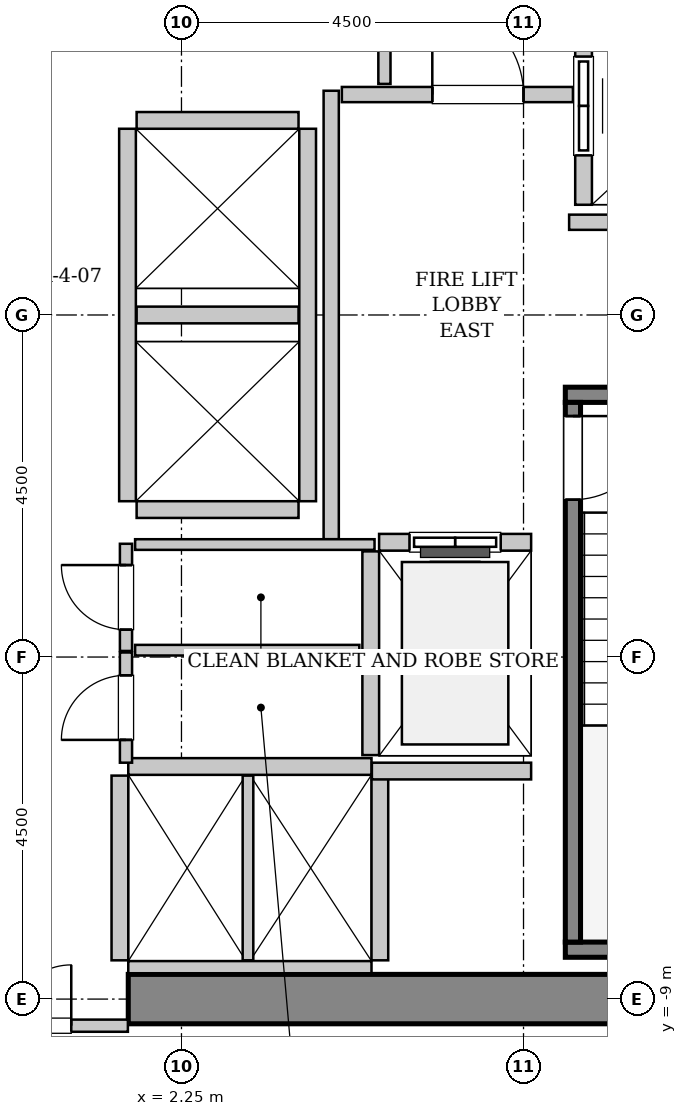
"""IFC4 building model, lengths in metres.
Left out: names, types, materials, properties, quantities, classifications, styles, units other than length and angle.
Written with IfcOpenShell. Run it as: python <this file> out.ifc"""

import sys

from ifc_helpers import new_model, si_unit, direction, frame, frame_2d, origin, place, context, subcontext, project, spatial, rectangle, extrude, source, transform, mapped, element, fill, save


model = new_model("IFC4")
c1 = context("Model", 3, precision=1e-05, world=origin(), true_north=direction((0.0, 1.0)))
c2 = subcontext(c1, "Body", "Model", "MODEL_VIEW")
j1 = project(units=[si_unit("LENGTHUNIT", "METRE"), si_unit("PLANEANGLEUNIT", "RADIAN")], contexts=[c1])
p1 = place(None, origin())
s1 = spatial("IfcSite", under=j1, at=p1, CompositionType="ELEMENT")
p2 = place(p1, origin())
s2 = spatial("IfcBuilding", under=s1, at=p2, CompositionType="ELEMENT")
p3 = place(p2, frame((0.0, 0.0, 40.6)))
s3 = spatial("IfcBuildingStorey", under=s2, at=p3, CompositionType="ELEMENT", Elevation=40.6)
m1 = source(origin(), c2, "Body", "SweptSolid", [
    extrude(rectangle(XDim=10.025, YDim=0.65, at=frame_2d((5.012, 0.0))), origin(), (0.0, 0.0, 1.0), 3.8),
])
p4 = place(p3, frame((1.55, -9.0, 0.0), z_axis=(0.0, 0.0, 1.0), x_axis=(1.0, 0.0, 0.0)))
e1 = element("IfcWall", 1, at=p4, inside=s3, PredefinedType="SHEAR", context=c2, shape_type="MappedRepresentation", body=[
    mapped(m1, transform((0.0, 0.0, 0.0), x_axis=(1.0, 0.0, 0.0), y_axis=(0.0, 1.0, 0.0), z_axis=(0.0, 0.0, 1.0), scale=1.0)),
])
m2 = source(origin(), c2, "Body", "SweptSolid", [
    extrude(rectangle(XDim=3.4, YDim=0.2, at=frame_2d((1.7, 0.0))), origin(), (0.0, 0.0, 1.0), 3.8),
])
p5 = place(p3, frame((7.3, -1.05, 0.0), z_axis=(0.0, 0.0, 1.0), x_axis=(1.0, 0.0, 0.0)))
e2 = element("IfcWall", 2, at=p5, inside=s3, PredefinedType="SOLIDWALL", context=c2, shape_type="MappedRepresentation", body=[
    mapped(m2, transform((0.0, 0.0, 0.0), x_axis=(1.0, 0.0, 0.0), y_axis=(0.0, 1.0, 0.0), z_axis=(0.0, 0.0, 1.0), scale=1.0)),
])
m3 = source(origin(), c2, "Body", "SweptSolid", [
    extrude(rectangle(XDim=3.63, YDim=0.2, at=frame_2d((1.815, 0.0))), origin(), (0.0, 0.0, 1.0), 3.8),
])
p6 = place(p3, frame((7.3, -8.35, 0.0), z_axis=(0.0, 0.0, 1.0), x_axis=(1.0, 0.0, 0.0)))
e3 = element("IfcWall", 3, at=p6, inside=s3, PredefinedType="SOLIDWALL", context=c2, shape_type="MappedRepresentation", body=[
    mapped(m3, transform((0.0, 0.0, 0.0), x_axis=(1.0, 0.0, 0.0), y_axis=(0.0, 1.0, 0.0), z_axis=(0.0, 0.0, 1.0), scale=1.0)),
])
m4 = source(origin(), c2, "Body", "SweptSolid", [
    extrude(rectangle(XDim=7.1, YDim=0.2, at=frame_2d((3.55, 0.0))), origin(), (0.0, 0.0, 1.0), 3.8),
])
p7 = place(p3, frame((7.4, -1.15, 0.0), z_axis=(0.0, 0.0, 1.0), x_axis=(0.0, -1.0, 0.0)))
e4 = element("IfcWall", 4, at=p7, inside=s3, PredefinedType="SOLIDWALL", context=c2, shape_type="MappedRepresentation", body=[
    mapped(m4, transform((0.0, 0.0, 0.0), x_axis=(1.0, 0.0, 0.0), y_axis=(0.0, 1.0, 0.0), z_axis=(0.0, 0.0, 1.0), scale=1.0)),
])
p8 = place(p7, frame((0.18, 0.0, 0.0)))
e5 = element("IfcOpeningElement", 5, at=p8, cuts=e4, PredefinedType="OPENING", context=c2, shape_type="SweptSolid", body=[
    extrude(rectangle(XDim=1.1, YDim=2.15, at=frame_2d((0.55, 1.075))), frame((0.0, 0.11, 0.0), z_axis=(0.0, -1.0, 0.0), x_axis=(1.0, 0.0, 0.0)), (0.0, 0.0, 1.0), 0.22),
])
m5 = source(origin(), c2, "Body", "SweptSolid", [
    extrude(rectangle(XDim=2.0, YDim=0.22, at=frame_2d((1.0, 0.0))), origin(), (0.0, 0.0, 1.0), 3.535),
])
p9 = place(p3, frame((6.85, -2.99, 0.0), z_axis=(0.0, 0.0, 1.0), x_axis=(-1.0, 0.0, 0.0)))
e6 = element("IfcWall", 6, at=p9, inside=s3, PredefinedType="SOLIDWALL", context=c2, shape_type="MappedRepresentation", body=[
    mapped(m5, transform((0.0, 0.0, 0.0), x_axis=(1.0, 0.0, 0.0), y_axis=(0.0, 1.0, 0.0), z_axis=(0.0, 0.0, 1.0), scale=1.0)),
])
p10 = place(p9, frame((0.4, 0.0, 0.0)))
e7 = element("IfcOpeningElement", 7, at=p10, cuts=e6, PredefinedType="OPENING", context=c2, shape_type="SweptSolid", body=[
    extrude(rectangle(XDim=1.2, YDim=2.2, at=frame_2d((0.6, 1.1))), frame((0.0, 0.12, 0.0), z_axis=(0.0, -1.0, 0.0), x_axis=(1.0, 0.0, 0.0)), (0.0, 0.0, 1.0), 0.24),
])
m6 = source(origin(), c2, "Body", "SweptSolid", [
    extrude(rectangle(XDim=2.68, YDim=0.22, at=frame_2d((1.34, 0.0))), origin(), (0.0, 0.0, 1.0), 3.535),
])
p11 = place(p3, frame((4.74, -3.11, 0.0), z_axis=(0.0, 0.0, 1.0), x_axis=(0.0, -1.0, 0.0)))
e8 = element("IfcWall", 8, at=p11, inside=s3, PredefinedType="SOLIDWALL", context=c2, shape_type="MappedRepresentation", body=[
    mapped(m6, transform((0.0, 0.0, 0.0), x_axis=(1.0, 0.0, 0.0), y_axis=(0.0, 1.0, 0.0), z_axis=(0.0, 0.0, 1.0), scale=1.0)),
])
m7 = source(origin(), c2, "Body", "SweptSolid", [
    extrude(rectangle(XDim=5.45, YDim=0.22, at=frame_2d((2.725, 0.0))), origin(), (0.0, 0.0, 1.0), 3.535),
])
p12 = place(p3, frame((7.54, 6.9, 0.0), z_axis=(0.0, 0.0, 1.0), x_axis=(0.0, -1.0, 0.0)))
e9 = element("IfcWall", 9, at=p12, inside=s3, PredefinedType="SOLIDWALL", context=c2, shape_type="MappedRepresentation", body=[
    mapped(m7, transform((0.0, 0.0, 0.0), x_axis=(1.0, 0.0, 0.0), y_axis=(0.0, 1.0, 0.0), z_axis=(0.0, 0.0, 1.0), scale=1.0)),
])
p13 = place(p12, frame((3.5, 0.0, 0.0)))
e10 = element("IfcOpeningElement", 10, at=p13, cuts=e9, PredefinedType="OPENING", context=c2, shape_type="SweptSolid", body=[
    extrude(rectangle(XDim=1.3, YDim=2.3, at=frame_2d((0.65, 1.15))), frame((0.0, 0.12, 0.0), z_axis=(0.0, -1.0, 0.0), x_axis=(1.0, 0.0, 0.0)), (0.0, 0.0, 1.0), 0.24),
])
p14 = place(p12, frame((0.65, 0.0, 0.0)))
e11 = element("IfcOpeningElement", 11, at=p14, cuts=e9, PredefinedType="OPENING", context=c2, shape_type="SweptSolid", body=[
    extrude(rectangle(XDim=1.3, YDim=2.3, at=frame_2d((0.65, 1.15))), frame((0.0, 0.12, 0.0), z_axis=(0.0, -1.0, 0.0), x_axis=(1.0, 0.0, 0.0)), (0.0, 0.0, 1.0), 0.24),
])
m8 = source(origin(), c2, "Body", "SweptSolid", [
    extrude(rectangle(XDim=3.2, YDim=0.22, at=frame_2d((1.6, 0.0))), origin(), (0.0, 0.0, 1.0), 3.535),
])
p15 = place(p3, frame((4.75, -5.94, 0.0), z_axis=(0.0, 0.0, 1.0), x_axis=(-1.0, 0.0, 0.0)))
e12 = element("IfcWall", 12, at=p15, inside=s3, PredefinedType="SOLIDWALL", context=c2, shape_type="MappedRepresentation", body=[
    mapped(m8, transform((0.0, 0.0, 0.0), x_axis=(1.0, 0.0, 0.0), y_axis=(0.0, 1.0, 0.0), z_axis=(0.0, 0.0, 1.0), scale=1.0)),
])
m9 = source(origin(), c2, "Body", "SweptSolid", [
    extrude(rectangle(XDim=3.2, YDim=0.16, at=frame_2d((1.6, 0.0))), origin(), (0.0, 0.0, 1.0), 2.425),
])
p16 = place(p3, frame((1.55, -8.58, 0.0), z_axis=(0.0, 0.0, 1.0), x_axis=(1.0, 0.0, 0.0)))
e13 = element("IfcWall", 13, at=p16, inside=s3, PredefinedType="PARTITIONING", context=c2, shape_type="MappedRepresentation", body=[
    mapped(m9, transform((0.0, 0.0, 0.0), x_axis=(1.0, 0.0, 0.0), y_axis=(0.0, 1.0, 0.0), z_axis=(0.0, 0.0, 1.0), scale=1.0)),
])
m10 = source(origin(), c2, "Body", "SweptSolid", [
    extrude(rectangle(XDim=2.43, YDim=0.22, at=frame_2d((1.215, 0.0))), origin(), (0.0, 0.0, 1.0), 3.535),
])
p17 = place(p3, frame((1.44, -6.06, 0.0), z_axis=(0.0, 0.0, 1.0), x_axis=(0.0, -1.0, 0.0)))
e14 = element("IfcWall", 14, at=p17, inside=s3, PredefinedType="SOLIDWALL", context=c2, shape_type="MappedRepresentation", body=[
    mapped(m10, transform((0.0, 0.0, 0.0), x_axis=(1.0, 0.0, 0.0), y_axis=(0.0, 1.0, 0.0), z_axis=(0.0, 0.0, 1.0), scale=1.0)),
])
m11 = source(origin(), c2, "Body", "SweptSolid", [
    extrude(rectangle(XDim=2.43, YDim=0.14, at=frame_2d((1.215, 0.0))), origin(), (0.0, 0.0, 1.0), 3.535),
])
p18 = place(p3, frame((3.125, -8.49, 0.0), z_axis=(0.0, 0.0, 1.0), x_axis=(0.0, 1.0, 0.0)))
e15 = element("IfcWall", 15, at=p18, inside=s3, PredefinedType="PARTITIONING", context=c2, shape_type="MappedRepresentation", body=[
    mapped(m11, transform((0.0, 0.0, 0.0), x_axis=(1.0, 0.0, 0.0), y_axis=(0.0, 1.0, 0.0), z_axis=(0.0, 0.0, 1.0), scale=1.0)),
])
p19 = place(p3, frame((4.86, -8.49, 0.0), z_axis=(0.0, 0.0, 1.0), x_axis=(0.0, 1.0, 0.0)))
e16 = element("IfcWall", 16, at=p19, inside=s3, PredefinedType="SOLIDWALL", context=c2, shape_type="MappedRepresentation", body=[
    mapped(m10, transform((0.0, 0.0, 0.0), x_axis=(1.0, 0.0, 0.0), y_axis=(0.0, 1.0, 0.0), z_axis=(0.0, 0.0, 1.0), scale=1.0)),
])
m12 = source(origin(), c2, "Body", "SweptSolid", [
    extrude(rectangle(XDim=4.9, YDim=0.22, at=frame_2d((2.45, 0.0))), origin(), (0.0, 0.0, 1.0), 3.535),
])
for number, where, z_axis, x_axis in (
    (17, (1.54, 2.45, 0.0), (0.0, 0.0, 1.0), (0.0, -1.0, 0.0)),
    (18, (3.91, -2.45, 0.0), (0.0, 0.0, 1.0), (0.0, 1.0, 0.0)),
):
    element("IfcWall", number, at=place(p3, frame(where, z_axis=z_axis, x_axis=x_axis)), inside=s3, PredefinedType="SOLIDWALL", context=c2, shape_type="MappedRepresentation", body=[
        mapped(m12, transform((0.0, 0.0, 0.0), x_axis=(1.0, 0.0, 0.0), y_axis=(0.0, 1.0, 0.0), z_axis=(0.0, 0.0, 1.0), scale=1.0)),
    ])
m13 = source(origin(), c2, "Body", "SweptSolid", [
    extrude(rectangle(XDim=2.13, YDim=0.22, at=frame_2d((1.065, 0.0))), origin(), (0.0, 0.0, 1.0), 3.535),
])
for number, where, z_axis, x_axis in (
    (19, (1.66, -2.56, 0.0), (0.0, 0.0, 1.0), (1.0, 0.0, 0.0)),
    (20, (1.66, 0.0, 0.0), (0.0, 0.0, 1.0), (1.0, 0.0, 0.0)),
    (21, (3.79, 2.56, 0.0), (0.0, 0.0, 1.0), (-1.0, 0.0, 0.0)),
):
    element("IfcWall", number, at=place(p3, frame(where, z_axis=z_axis, x_axis=x_axis)), inside=s3, PredefinedType="SOLIDWALL", context=c2, shape_type="MappedRepresentation", body=[
        mapped(m13, transform((0.0, 0.0, 0.0), x_axis=(1.0, 0.0, 0.0), y_axis=(0.0, 1.0, 0.0), z_axis=(0.0, 0.0, 1.0), scale=1.0)),
    ])
m14 = source(origin(), c2, "Body", "SweptSolid", [
    extrude(rectangle(XDim=2.095, YDim=0.22, at=frame_2d((1.048, 0.0))), origin(), (0.0, 0.0, 1.0), 3.535),
])
p20 = place(p3, frame((4.755, -6.0, 0.0), z_axis=(0.0, 0.0, 1.0), x_axis=(1.0, 0.0, 0.0)))
e22 = element("IfcWall", 22, at=p20, inside=s3, PredefinedType="SOLIDWALL", context=c2, shape_type="MappedRepresentation", body=[
    mapped(m14, transform((0.0, 0.0, 0.0), x_axis=(1.0, 0.0, 0.0), y_axis=(0.0, 1.0, 0.0), z_axis=(0.0, 0.0, 1.0), scale=1.0)),
])
m15 = source(origin(), c2, "Body", "SweptSolid", [
    extrude(rectangle(XDim=5.9, YDim=0.2, at=frame_2d((2.95, 0.0))), origin(), (0.0, 0.0, 1.0), 3.535),
])
p21 = place(p3, frame((4.22, -2.95, 0.0), z_axis=(0.0, 0.0, 1.0), x_axis=(0.0, 1.0, 0.0)))
e23 = element("IfcWall", 23, at=p21, inside=s3, PredefinedType="PARTITIONING", context=c2, shape_type="MappedRepresentation", body=[
    mapped(m15, transform((0.0, 0.0, 0.0), x_axis=(1.0, 0.0, 0.0), y_axis=(0.0, 1.0, 0.0), z_axis=(0.0, 0.0, 1.0), scale=1.0)),
])
m16 = source(origin(), c2, "Body", "SweptSolid", [
    extrude(rectangle(XDim=3.04, YDim=0.2, at=frame_2d((1.52, 0.0))), origin(), (0.0, 0.0, 1.0), 3.535),
])
p22 = place(p3, frame((4.36, 2.9, 0.0), z_axis=(0.0, 0.0, 1.0), x_axis=(1.0, 0.0, 0.0)))
e24 = element("IfcWall", 24, at=p22, inside=s3, PredefinedType="PARTITIONING", context=c2, shape_type="MappedRepresentation", body=[
    mapped(m16, transform((0.0, 0.0, 0.0), x_axis=(1.0, 0.0, 0.0), y_axis=(0.0, 1.0, 0.0), z_axis=(0.0, 0.0, 1.0), scale=1.0)),
])
p23 = place(p22, frame((1.19, 0.0, 0.0)))
e25 = element("IfcOpeningElement", 25, at=p23, cuts=e24, PredefinedType="OPENING", context=c2, shape_type="SweptSolid", body=[
    extrude(rectangle(XDim=1.2, YDim=2.15, at=frame_2d((0.6, 1.075))), frame((0.0, 0.11, 0.0), z_axis=(0.0, -1.0, 0.0), x_axis=(1.0, 0.0, 0.0)), (0.0, 0.0, 1.0), 0.22),
])
m17 = source(origin(), c2, "Body", "SweptSolid", [
    extrude(rectangle(XDim=4.11, YDim=0.2, at=frame_2d((2.055, 0.0))), origin(), (0.0, 0.0, 1.0), 3.535),
])
p24 = place(p3, frame((7.35, 1.22, 0.0), z_axis=(0.0, 0.0, 1.0), x_axis=(1.0, 0.0, 0.0)))
e26 = element("IfcWall", 26, at=p24, inside=s3, PredefinedType="PARTITIONING", context=c2, shape_type="MappedRepresentation", body=[
    mapped(m17, transform((0.0, 0.0, 0.0), x_axis=(1.0, 0.0, 0.0), y_axis=(0.0, 1.0, 0.0), z_axis=(0.0, 0.0, 1.0), scale=1.0)),
])
m18 = source(origin(), c2, "Body", "SweptSolid", [
    extrude(rectangle(XDim=3.09, YDim=0.16, at=frame_2d((1.545, 0.0))), origin(), (0.0, 0.0, 1.0), 2.425),
])
p25 = place(p3, frame((-1.545, -9.35, 0.0), z_axis=(0.0, 0.0, 1.0), x_axis=(1.0, 0.0, 0.0)))
e27 = element("IfcWall", 27, at=p25, inside=s3, PredefinedType="PARTITIONING", context=c2, shape_type="MappedRepresentation", body=[
    mapped(m18, transform((0.0, 0.0, 0.0), x_axis=(1.0, 0.0, 0.0), y_axis=(0.0, 1.0, 0.0), z_axis=(0.0, 0.0, 1.0), scale=1.0)),
])
p26 = place(p25, frame((0.745, 0.0, 0.0)))
e28 = element("IfcOpeningElement", 28, at=p26, cuts=e27, PredefinedType="OPENING", context=c2, shape_type="SweptSolid", body=[
    extrude(rectangle(XDim=1.6, YDim=2.3, at=frame_2d((0.8, 1.15))), frame((0.0, 0.09, 0.0), z_axis=(0.0, -1.0, 0.0), x_axis=(1.0, 0.0, 0.0)), (0.0, 0.0, 1.0), 0.18),
])
m19 = source(origin(), c2, "Body", "SweptSolid", [
    extrude(rectangle(XDim=3.015, YDim=0.16, at=frame_2d((1.507, 0.0))), origin(), (0.0, 0.0, 1.0), 3.535),
])
p27 = place(p3, frame((4.92, 3.04, 0.0), z_axis=(0.0, 0.0, 1.0), x_axis=(0.0, 1.0, 0.0)))
e29 = element("IfcWall", 29, at=p27, inside=s3, PredefinedType="PARTITIONING", context=c2, shape_type="MappedRepresentation", body=[
    mapped(m19, transform((0.0, 0.0, 0.0), x_axis=(1.0, 0.0, 0.0), y_axis=(0.0, 1.0, 0.0), z_axis=(0.0, 0.0, 1.0), scale=1.0)),
])
m20 = source(origin(), c2, "Body", "SweptSolid", [
    extrude(rectangle(XDim=1.41, YDim=0.16, at=frame_2d((0.705, 0.0))), origin(), (0.0, 0.0, 1.0), 3.535),
])
p28 = place(p3, frame((1.52, -4.42, 0.0), z_axis=(0.0, 0.0, 1.0), x_axis=(0.0, 1.0, 0.0)))
e30 = element("IfcWall", 30, at=p28, inside=s3, PredefinedType="PARTITIONING", context=c2, shape_type="MappedRepresentation", body=[
    mapped(m20, transform((0.0, 0.0, 0.0), x_axis=(1.0, 0.0, 0.0), y_axis=(0.0, 1.0, 0.0), z_axis=(0.0, 0.0, 1.0), scale=1.0)),
])
p29 = place(p28, frame((0.28, 0.0, 0.0)))
e31 = element("IfcOpeningElement", 31, at=p29, cuts=e30, PredefinedType="OPENING", context=c2, shape_type="SweptSolid", body=[
    extrude(rectangle(XDim=0.85, YDim=2.1, at=frame_2d((0.425, 1.05))), frame((0.0, 0.09, 0.0), z_axis=(0.0, -1.0, 0.0), x_axis=(1.0, 0.0, 0.0)), (0.0, 0.0, 1.0), 0.18),
])
m21 = source(origin(), c2, "Body", "SweptSolid", [
    extrude(rectangle(XDim=3.15, YDim=0.14, at=frame_2d((1.575, 0.0))), origin(), (0.0, 0.0, 1.0), 3.535),
])
p30 = place(p3, frame((1.64, -3.02, 0.0), z_axis=(0.0, 0.0, 1.0), x_axis=(1.0, 0.0, 0.0)))
e32 = element("IfcWall", 32, at=p30, inside=s3, PredefinedType="PARTITIONING", context=c2, shape_type="MappedRepresentation", body=[
    mapped(m21, transform((0.0, 0.0, 0.0), x_axis=(1.0, 0.0, 0.0), y_axis=(0.0, 1.0, 0.0), z_axis=(0.0, 0.0, 1.0), scale=1.0)),
])
m22 = source(origin(), c2, "Body", "SweptSolid", [
    extrude(rectangle(XDim=2.95, YDim=0.14, at=frame_2d((1.475, 0.0))), origin(), (0.0, 0.0, 1.0), 3.535),
])
p31 = place(p3, frame((1.64, -4.41, 0.0), z_axis=(0.0, 0.0, 1.0), x_axis=(1.0, 0.0, 0.0)))
e33 = element("IfcWall", 33, at=p31, inside=s3, PredefinedType="PARTITIONING", context=c2, shape_type="MappedRepresentation", body=[
    mapped(m22, transform((0.0, 0.0, 0.0), x_axis=(1.0, 0.0, 0.0), y_axis=(0.0, 1.0, 0.0), z_axis=(0.0, 0.0, 1.0), scale=1.0)),
])
m23 = source(origin(), c2, "Body", "SweptSolid", [
    extrude(rectangle(XDim=1.45, YDim=0.16, at=frame_2d((0.725, 0.0))), origin(), (0.0, 0.0, 1.0), 3.535),
])
p32 = place(p3, frame((1.52, -5.89, 0.0), z_axis=(0.0, 0.0, 1.0), x_axis=(0.0, 1.0, 0.0)))
e34 = element("IfcWall", 34, at=p32, inside=s3, PredefinedType="PARTITIONING", context=c2, shape_type="MappedRepresentation", body=[
    mapped(m23, transform((0.0, 0.0, 0.0), x_axis=(1.0, 0.0, 0.0), y_axis=(0.0, 1.0, 0.0), z_axis=(0.0, 0.0, 1.0), scale=1.0)),
])
p33 = place(p32, frame((0.3, 0.0, 0.0)))
e35 = element("IfcOpeningElement", 35, at=p33, cuts=e34, PredefinedType="OPENING", context=c2, shape_type="SweptSolid", body=[
    extrude(rectangle(XDim=0.85, YDim=2.1, at=frame_2d((0.425, 1.05))), frame((0.0, 0.09, 0.0), z_axis=(0.0, -1.0, 0.0), x_axis=(1.0, 0.0, 0.0)), (0.0, 0.0, 1.0), 0.18),
])
m24 = source(origin(), c2, "Body", "SweptSolid", [
    extrude(rectangle(XDim=1.1, YDim=2.15, at=frame_2d((0.55, 1.075))), frame((0.0, 0.025, 0.0), z_axis=(0.0, -1.0, 0.0), x_axis=(1.0, 0.0, 0.0)), (0.0, 0.0, 1.0), 0.05),
])
p34 = place(p8, origin())
e36 = element("IfcDoor", 36, at=p34, inside=s3, OperationType="SINGLE_SWING_LEFT", PredefinedType="DOOR", context=c2, shape_type="MappedRepresentation", body=[
    mapped(m24, transform((0.0, 0.0, 0.0), x_axis=(1.0, 0.0, 0.0), y_axis=(0.0, 1.0, 0.0), z_axis=(0.0, 0.0, 1.0), scale=1.0)),
])
fill(e5, e36)
m25 = source(origin(), c2, "Body", "SweptSolid", [
    extrude(rectangle(XDim=1.2, YDim=2.2, at=frame_2d((0.6, 1.1))), frame((0.0, 0.025, 0.0), z_axis=(0.0, -1.0, 0.0), x_axis=(1.0, 0.0, 0.0)), (0.0, 0.0, 1.0), 0.05),
])
p35 = place(p10, origin())
e37 = element("IfcDoor", 37, at=p35, inside=s3, OperationType="SLIDING_TO_LEFT", PredefinedType="DOOR", context=c2, shape_type="MappedRepresentation", body=[
    mapped(m25, transform((0.0, 0.0, 0.0), x_axis=(1.0, 0.0, 0.0), y_axis=(0.0, 1.0, 0.0), z_axis=(0.0, 0.0, 1.0), scale=1.0)),
])
fill(e7, e37)
m26 = source(origin(), c2, "Body", "SweptSolid", [
    extrude(rectangle(XDim=1.3, YDim=2.3, at=frame_2d((0.65, 1.15))), frame((0.0, 0.025, 0.0), z_axis=(0.0, -1.0, 0.0), x_axis=(1.0, 0.0, 0.0)), (0.0, 0.0, 1.0), 0.05),
])
p36 = place(p13, origin())
e38 = element("IfcDoor", 38, at=p36, inside=s3, OperationType="SLIDING_TO_RIGHT", PredefinedType="DOOR", context=c2, shape_type="MappedRepresentation", body=[
    mapped(m26, transform((0.0, 0.0, 0.0), x_axis=(1.0, 0.0, 0.0), y_axis=(0.0, 1.0, 0.0), z_axis=(0.0, 0.0, 1.0), scale=1.0)),
])
fill(e10, e38)
m27 = source(origin(), c2, "Body", "SweptSolid", [
    extrude(rectangle(XDim=1.2, YDim=2.15, at=frame_2d((0.6, 1.075))), frame((0.0, 0.025, 0.0), z_axis=(0.0, -1.0, 0.0), x_axis=(1.0, 0.0, 0.0)), (0.0, 0.0, 1.0), 0.05),
])
p37 = place(p23, origin())
e39 = element("IfcDoor", 39, at=p37, inside=s3, OperationType="SINGLE_SWING_LEFT", PredefinedType="DOOR", context=c2, shape_type="MappedRepresentation", body=[
    mapped(m27, transform((0.0, 0.0, 0.0), x_axis=(1.0, 0.0, 0.0), y_axis=(0.0, 1.0, 0.0), z_axis=(0.0, 0.0, 1.0), scale=1.0)),
])
fill(e25, e39)
m28 = source(origin(), c2, "Body", "SweptSolid", [
    extrude(rectangle(XDim=1.6, YDim=2.3, at=frame_2d((0.8, 1.15))), frame((0.0, 0.025, 0.0), z_axis=(0.0, -1.0, 0.0), x_axis=(1.0, 0.0, 0.0)), (0.0, 0.0, 1.0), 0.05),
])
p38 = place(p26, origin())
e40 = element("IfcDoor", 40, at=p38, inside=s3, OperationType="DOUBLE_DOOR_SINGLE_SWING", PredefinedType="DOOR", context=c2, shape_type="MappedRepresentation", body=[
    mapped(m28, transform((0.0, 0.0, 0.0), x_axis=(1.0, 0.0, 0.0), y_axis=(0.0, 1.0, 0.0), z_axis=(0.0, 0.0, 1.0), scale=1.0)),
])
fill(e28, e40)
m29 = source(origin(), c2, "Body", "SweptSolid", [
    extrude(rectangle(XDim=0.85, YDim=2.1, at=frame_2d((0.425, 1.05))), frame((0.0, 0.025, 0.0), z_axis=(0.0, -1.0, 0.0), x_axis=(1.0, 0.0, 0.0)), (0.0, 0.0, 1.0), 0.05),
])
p39 = place(p29, origin())
e41 = element("IfcDoor", 41, at=p39, inside=s3, OperationType="SINGLE_SWING_RIGHT", PredefinedType="DOOR", context=c2, shape_type="MappedRepresentation", body=[
    mapped(m29, transform((0.0, 0.0, 0.0), x_axis=(1.0, 0.0, 0.0), y_axis=(0.0, 1.0, 0.0), z_axis=(0.0, 0.0, 1.0), scale=1.0)),
])
fill(e31, e41)
p40 = place(p33, origin())
e42 = element("IfcDoor", 42, at=p40, inside=s3, OperationType="SINGLE_SWING_LEFT", PredefinedType="DOOR", context=c2, shape_type="MappedRepresentation", body=[
    mapped(m29, transform((0.0, 0.0, 0.0), x_axis=(1.0, 0.0, 0.0), y_axis=(0.0, 1.0, 0.0), z_axis=(0.0, 0.0, 1.0), scale=1.0)),
])
fill(e35, e42)
save(model, sys.argv[1])
